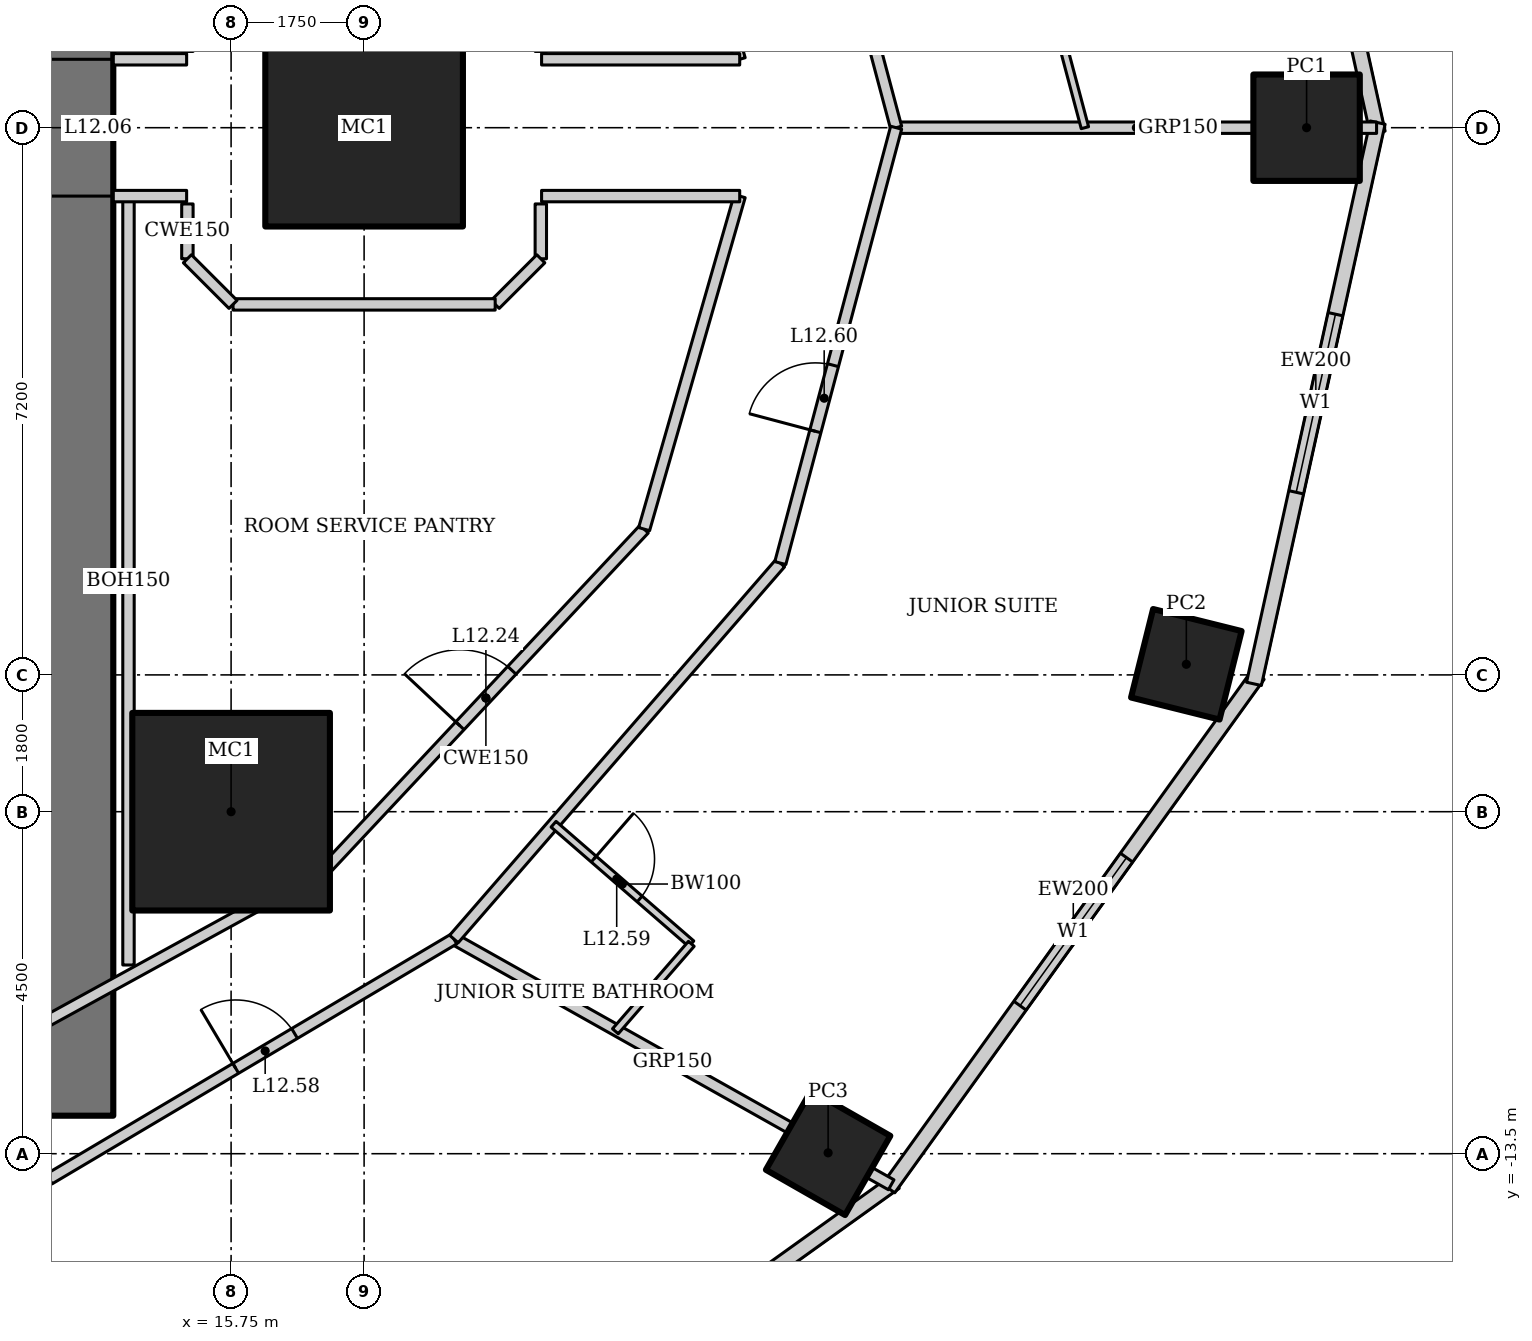
"""IFC4 building model, lengths in metres.
Left out: names, types, materials, properties, quantities, classifications, styles, units other than length and angle.
Written with IfcOpenShell. Run it as: python <this file> out.ifc"""

import sys

from ifc_helpers import new_model, si_unit, direction, frame, frame_2d, origin, origin_2d, place, context, subcontext, project, spatial, rectangle, hollow_rectangle, extrude, element, fill, save


model = new_model("IFC4")
c1 = context("Model", 3, precision=1e-05, world=origin(), true_north=direction((0.0, 1.0)))
c2 = subcontext(c1, "Body", "Model", "MODEL_VIEW")
j1 = project(units=[si_unit("LENGTHUNIT", "METRE"), si_unit("PLANEANGLEUNIT", "RADIAN")], contexts=[c1])
p1 = place(None, origin())
s1 = spatial("IfcSite", under=j1, at=p1, CompositionType="ELEMENT")
p2 = place(p1, origin())
s2 = spatial("IfcBuilding", under=s1, at=p2, CompositionType="ELEMENT")
p3 = place(p2, frame((0.0, 0.0, 58.6)))
s3 = spatial("IfcBuildingStorey", under=s2, at=p3, CompositionType="ELEMENT", Elevation=58.6)
for number, where, z_axis, x_axis in (
    (1, (17.5, 0.0, 0.0), (0.0, 0.0, 1.0), (1.0, 0.0, 0.0)),
    (2, (15.75, -9.0, 0.0), (0.0, 0.0, 1.0), (1.0, 0.0, 0.0)),
):
    element("IfcColumn", number, at=place(p3, frame(where, z_axis=z_axis, x_axis=x_axis)), inside=s3, PredefinedType="COLUMN", context=c2, shape_type="SweptSolid", body=[
        extrude(hollow_rectangle(XDim=2.6, YDim=2.6, WallThickness=0.13, at=origin_2d()), origin(), (0.0, 0.0, 1.0), 3.6),
    ])
p4 = place(p3, frame((29.9, 0.0, 0.0), z_axis=(0.0, 0.0, 1.0), x_axis=(1.0, 0.0, 0.0)))
e3 = element("IfcColumn", 3, at=p4, inside=s3, PredefinedType="COLUMN", context=c2, shape_type="SweptSolid", body=[
    extrude(hollow_rectangle(XDim=1.4, YDim=1.4, WallThickness=0.1, at=origin_2d()), origin(), (0.0, 0.0, 1.0), 3.6),
])
p5 = place(p3, frame((23.605, -13.489, 0.0), z_axis=(0.0, 0.0, 1.0), x_axis=(0.496139221777, 0.86824298017, 0.0)))
e4 = element("IfcColumn", 4, at=p5, inside=s3, PredefinedType="COLUMN", context=c2, shape_type="SweptSolid", body=[
    extrude(hollow_rectangle(XDim=1.2, YDim=1.2, WallThickness=0.12, at=origin_2d()), origin(), (0.0, 0.0, 1.0), 3.6),
])
p6 = place(p3, frame((28.318, -7.06, 0.0), z_axis=(0.0, 0.0, 1.0), x_axis=(0.2419218956, 0.970295726276, 0.0)))
e5 = element("IfcColumn", 5, at=p6, inside=s3, PredefinedType="COLUMN", context=c2, shape_type="SweptSolid", body=[
    extrude(hollow_rectangle(XDim=1.2, YDim=1.2, WallThickness=0.1, at=origin_2d()), origin(), (0.0, 0.0, 1.0), 3.6),
])
p7 = place(p3, frame((13.2, -13.0, 0.0), z_axis=(0.0, 0.0, 1.0), x_axis=(0.0, 1.0, 0.0)))
e6 = element("IfcWall", 6, at=p7, inside=s3, PredefinedType="SHEAR", context=c2, shape_type="SweptSolid", body=[
    extrude(rectangle(XDim=26.0, YDim=2.0, at=frame_2d((13.0, 0.0))), origin(), (0.0, 0.0, 1.0), 3.6),
])
p8 = place(p7, frame((12.1, 0.0, 0.0)))
e7 = element("IfcOpeningElement", 7, at=p8, cuts=e6, PredefinedType="OPENING", context=c2, shape_type="SweptSolid", body=[
    extrude(rectangle(XDim=1.8, YDim=2.1, at=frame_2d((0.9, 1.05))), frame((0.0, 1.01, 0.0), z_axis=(0.0, -1.0, 0.0), x_axis=(1.0, 0.0, 0.0)), (0.0, 0.0, 1.0), 2.02),
])
p9 = place(p3, frame((30.835, -0.067, 0.0), z_axis=(0.0, 0.0, 1.0), x_axis=(-0.215238065514, 0.976561608478, 0.0)))
e8 = element("IfcWall", 8, at=p9, inside=s3, PredefinedType="SOLIDWALL", context=c2, shape_type="SweptSolid", body=[
    extrude(rectangle(XDim=7.562, YDim=0.2, at=frame_2d((3.781, 0.0))), origin(), (0.0, 0.0, 1.0), 3.45),
])
p10 = place(p9, frame((2.581, 0.0, 0.5)))
e9 = element("IfcOpeningElement", 9, at=p10, cuts=e8, PredefinedType="OPENING", context=c2, shape_type="SweptSolid", body=[
    extrude(rectangle(XDim=2.4, YDim=2.2, at=frame_2d((1.2, 1.1))), frame((0.0, 0.11, 0.0), z_axis=(0.0, -1.0, 0.0), x_axis=(1.0, 0.0, 0.0)), (0.0, 0.0, 1.0), 0.22),
])
p11 = place(p3, frame((17.929, -18.572, 0.0), z_axis=(0.0, 0.0, 1.0), x_axis=(0.812791321576, 0.582554948112, 0.0)))
e10 = element("IfcWall", 10, at=p11, inside=s3, PredefinedType="SOLIDWALL", context=c2, shape_type="SweptSolid", body=[
    extrude(rectangle(XDim=8.063, YDim=0.2, at=frame_2d((4.032, 0.0))), origin(), (0.0, 0.0, 1.0), 3.45),
])
p12 = place(p11, frame((2.832, 0.0, 0.5)))
e11 = element("IfcOpeningElement", 11, at=p12, cuts=e10, PredefinedType="OPENING", context=c2, shape_type="SweptSolid", body=[
    extrude(rectangle(XDim=2.4, YDim=2.2, at=frame_2d((1.2, 1.1))), frame((0.0, 0.11, 0.0), z_axis=(0.0, -1.0, 0.0), x_axis=(1.0, 0.0, 0.0)), (0.0, 0.0, 1.0), 0.22),
])
p13 = place(p3, frame((24.4, -13.957, 0.0), z_axis=(0.0, 0.0, 1.0), x_axis=(0.583937613703, 0.811798536155, 0.0)))
e12 = element("IfcWall", 12, at=p13, inside=s3, PredefinedType="SOLIDWALL", context=c2, shape_type="SweptSolid", body=[
    extrude(rectangle(XDim=8.323, YDim=0.2, at=frame_2d((4.162, 0.0))), origin(), (0.0, 0.0, 1.0), 3.45),
])
p14 = place(p13, frame((2.961, 0.0, 0.5)))
e13 = element("IfcOpeningElement", 13, at=p14, cuts=e12, PredefinedType="OPENING", context=c2, shape_type="SweptSolid", body=[
    extrude(rectangle(XDim=2.4, YDim=2.2, at=frame_2d((1.2, 1.1))), frame((0.0, 0.11, 0.0), z_axis=(0.0, -1.0, 0.0), x_axis=(1.0, 0.0, 0.0)), (0.0, 0.0, 1.0), 0.22),
])
p15 = place(p3, frame((29.208, -7.318, 0.0), z_axis=(0.0, 0.0, 1.0), x_axis=(0.215238065514, 0.976561608478, 0.0)))
e14 = element("IfcWall", 14, at=p15, inside=s3, PredefinedType="SOLIDWALL", context=c2, shape_type="SweptSolid", body=[
    extrude(rectangle(XDim=7.562, YDim=0.2, at=frame_2d((3.781, 0.0))), origin(), (0.0, 0.0, 1.0), 3.45),
])
p16 = place(p15, frame((2.581, 0.0, 0.5)))
e15 = element("IfcOpeningElement", 15, at=p16, cuts=e14, PredefinedType="OPENING", context=c2, shape_type="SweptSolid", body=[
    extrude(rectangle(XDim=2.4, YDim=2.2, at=frame_2d((1.2, 1.1))), frame((0.0, 0.11, 0.0), z_axis=(0.0, -1.0, 0.0), x_axis=(1.0, 0.0, 0.0)), (0.0, 0.0, 1.0), 0.22),
])
p17 = place(p3, frame((30.821, 0.0, 0.0), z_axis=(0.0, 0.0, 1.0), x_axis=(-1.0, 0.0, 0.0)))
e16 = element("IfcWall", 16, at=p17, inside=s3, PredefinedType="PARTITIONING", context=c2, shape_type="SweptSolid", body=[
    extrude(rectangle(XDim=6.321, YDim=0.15, at=frame_2d((3.16, 0.0))), origin(), (0.0, 0.0, 1.0), 2.528),
])
p18 = place(p3, frame((24.435, -13.909, 0.0), z_axis=(0.0, 0.0, 1.0), x_axis=(-0.871747379892, 0.489955616001, 0.0)))
e17 = element("IfcWall", 17, at=p18, inside=s3, PredefinedType="PARTITIONING", context=c2, shape_type="SweptSolid", body=[
    extrude(rectangle(XDim=6.6, YDim=0.15, at=frame_2d((3.3, 0.0))), origin(), (0.0, 0.0, 1.0), 2.693),
])
p19 = place(p3, frame((24.5, 0.0, 0.0), z_axis=(0.0, 0.0, 1.0), x_axis=(-0.257083265334, 0.966389256296, 0.0)))
e18 = element("IfcWall", 18, at=p19, inside=s3, PredefinedType="PARTITIONING", context=c2, shape_type="SweptSolid", body=[
    extrude(rectangle(XDim=5.928, YDim=0.15, at=frame_2d((2.964, 0.0))), origin(), (0.0, 0.0, 1.0), 3.45),
])
p20 = place(p3, frame((13.357, -13.832, 0.0), z_axis=(0.0, 0.0, 1.0), x_axis=(0.860147339762, 0.510045639036, 0.0)))
e19 = element("IfcWall", 19, at=p20, inside=s3, PredefinedType="PARTITIONING", context=c2, shape_type="SweptSolid", body=[
    extrude(rectangle(XDim=6.19, YDim=0.15, at=frame_2d((3.095, 0.0))), origin(), (0.0, 0.0, 1.0), 3.45),
])
p21 = place(p20, frame((2.853, 0.0, 0.0)))
e20 = element("IfcOpeningElement", 20, at=p21, cuts=e19, PredefinedType="OPENING", context=c2, shape_type="SweptSolid", body=[
    extrude(rectangle(XDim=0.9, YDim=2.1, at=frame_2d((0.45, 1.05))), frame((0.0, 0.085, 0.0), z_axis=(0.0, -1.0, 0.0), x_axis=(1.0, 0.0, 0.0)), (0.0, 0.0, 1.0), 0.17),
])
p22 = place(p3, frame((18.681, -10.675, 0.0), z_axis=(0.0, 0.0, 1.0), x_axis=(0.655599989166, 0.755108372491, 0.0)))
e21 = element("IfcWall", 21, at=p22, inside=s3, PredefinedType="PARTITIONING", context=c2, shape_type="SweptSolid", body=[
    extrude(rectangle(XDim=6.551, YDim=0.15, at=frame_2d((3.275, 0.0))), origin(), (0.0, 0.0, 1.0), 3.45),
])
p23 = place(p3, frame((22.976, -5.729, 0.0), z_axis=(0.0, 0.0, 1.0), x_axis=(0.257083265334, 0.966389256296, 0.0)))
e22 = element("IfcWall", 22, at=p23, inside=s3, PredefinedType="PARTITIONING", context=c2, shape_type="SweptSolid", body=[
    extrude(rectangle(XDim=5.928, YDim=0.15, at=frame_2d((2.964, 0.0))), origin(), (0.0, 0.0, 1.0), 3.45),
])
p24 = place(p23, frame((1.794, 0.0, 0.0)))
e23 = element("IfcOpeningElement", 23, at=p24, cuts=e22, PredefinedType="OPENING", context=c2, shape_type="SweptSolid", body=[
    extrude(rectangle(XDim=0.9, YDim=2.1, at=frame_2d((0.45, 1.05))), frame((0.0, 0.085, 0.0), z_axis=(0.0, -1.0, 0.0), x_axis=(1.0, 0.0, 0.0)), (0.0, 0.0, 1.0), 0.17),
])
p25 = place(p3, frame((22.442, 0.9, 0.0), z_axis=(0.0, 0.0, 1.0), x_axis=(-0.27585972825, 0.961197903831, 0.0)))
e24 = element("IfcWall", 24, at=p25, inside=s3, PredefinedType="PARTITIONING", context=c2, shape_type="SweptSolid", body=[
    extrude(rectangle(XDim=4.559, YDim=0.15, at=frame_2d((2.279, 0.0))), origin(), (0.0, 0.0, 1.0), 3.45),
])
p26 = place(p3, frame((12.036, -12.464, 0.0), z_axis=(0.0, 0.0, 1.0), x_axis=(0.876522084062, 0.481361647986, 0.0)))
e25 = element("IfcWall", 25, at=p26, inside=s3, PredefinedType="PARTITIONING", context=c2, shape_type="SweptSolid", body=[
    extrude(rectangle(XDim=5.687, YDim=0.15, at=frame_2d((2.844, 0.0))), origin(), (0.0, 0.0, 1.0), 3.45),
])
p27 = place(p3, frame((17.021, -9.726, 0.0), z_axis=(0.0, 0.0, 1.0), x_axis=(0.68365836236, 0.729802194828, 0.0)))
e26 = element("IfcWall", 26, at=p27, inside=s3, PredefinedType="PARTITIONING", context=c2, shape_type="SweptSolid", body=[
    extrude(rectangle(XDim=6.09, YDim=0.15, at=frame_2d((3.045, 0.0))), origin(), (0.0, 0.0, 1.0), 3.45),
])
p28 = place(p27, frame((2.545, 0.0, 0.0)))
e27 = element("IfcOpeningElement", 27, at=p28, cuts=e26, PredefinedType="OPENING", context=c2, shape_type="SweptSolid", body=[
    extrude(rectangle(XDim=1.0, YDim=2.1, at=frame_2d((0.5, 1.05))), frame((0.0, 0.085, 0.0), z_axis=(0.0, -1.0, 0.0), x_axis=(1.0, 0.0, 0.0)), (0.0, 0.0, 1.0), 0.17),
])
p29 = place(p3, frame((21.184, -5.282, 0.0), z_axis=(0.0, 0.0, 1.0), x_axis=(0.27585972825, 0.961197903831, 0.0)))
e28 = element("IfcWall", 28, at=p29, inside=s3, PredefinedType="PARTITIONING", context=c2, shape_type="SweptSolid", body=[
    extrude(rectangle(XDim=4.559, YDim=0.15, at=frame_2d((2.279, 0.0))), origin(), (0.0, 0.0, 1.0), 3.45),
])
p30 = place(p3, frame((14.4, -11.017, 0.0), z_axis=(0.0, 0.0, 1.0), x_axis=(0.0, 1.0, 0.0)))
e29 = element("IfcWall", 29, at=p30, inside=s3, PredefinedType="PARTITIONING", context=c2, shape_type="SweptSolid", body=[
    extrude(rectangle(XDim=10.117, YDim=0.15, at=frame_2d((5.059, 0.0))), origin(), (0.0, 0.0, 1.0), 3.45),
])
p31 = place(p3, frame((26.305, 2.55, 0.0), z_axis=(0.0, 0.0, 1.0), x_axis=(0.257052122515, -0.966397540513, 0.0)))
e30 = element("IfcWall", 30, at=p31, inside=s3, PredefinedType="PARTITIONING", context=c2, shape_type="SweptSolid", body=[
    extrude(rectangle(XDim=2.638, YDim=0.1, at=frame_2d((1.319, 0.0))), origin(), (0.0, 0.0, 1.0), 3.45),
])
p32 = place(p3, frame((19.993, -9.165, 0.0), z_axis=(0.0, 0.0, 1.0), x_axis=(0.755098052661, -0.655611875172, 0.0)))
e31 = element("IfcWall", 31, at=p32, inside=s3, PredefinedType="PARTITIONING", context=c2, shape_type="SweptSolid", body=[
    extrude(rectangle(XDim=2.4, YDim=0.1, at=frame_2d((1.2, 0.0))), origin(), (0.0, 0.0, 1.0), 3.45),
])
p33 = place(p32, frame((0.7, 0.0, 0.0)))
e32 = element("IfcOpeningElement", 32, at=p33, cuts=e31, PredefinedType="OPENING", context=c2, shape_type="SweptSolid", body=[
    extrude(rectangle(XDim=0.8, YDim=2.1, at=frame_2d((0.4, 1.05))), frame((0.0, 0.06, 0.0), z_axis=(0.0, -1.0, 0.0), x_axis=(1.0, 0.0, 0.0)), (0.0, 0.0, 1.0), 0.12),
])
p34 = place(p3, frame((21.805, -10.738, 0.0), z_axis=(0.0, 0.0, 1.0), x_axis=(-0.655528024617, -0.755170847518, 0.0)))
e33 = element("IfcWall", 33, at=p34, inside=s3, PredefinedType="PARTITIONING", context=c2, shape_type="SweptSolid", body=[
    extrude(rectangle(XDim=1.524, YDim=0.1, at=frame_2d((0.762, 0.0))), origin(), (0.0, 0.0, 1.0), 3.45),
])
p35 = place(p3, frame((14.2, -0.9, 0.0), z_axis=(0.0, 0.0, 1.0), x_axis=(1.0, 0.0, 0.0)))
e34 = element("IfcWall", 34, at=p35, inside=s3, PredefinedType="PARTITIONING", context=c2, shape_type="SweptSolid", body=[
    extrude(rectangle(XDim=0.965, YDim=0.15, at=frame_2d((0.482, 0.0))), origin(), (0.0, 0.0, 1.0), 3.45),
])
p36 = place(p3, frame((19.835, -0.9, 0.0), z_axis=(0.0, 0.0, 1.0), x_axis=(1.0, 0.0, 0.0)))
e35 = element("IfcWall", 35, at=p36, inside=s3, PredefinedType="PARTITIONING", context=c2, shape_type="SweptSolid", body=[
    extrude(rectangle(XDim=2.607, YDim=0.15, at=frame_2d((1.303, 0.0))), origin(), (0.0, 0.0, 1.0), 3.45),
])
p37 = place(p3, frame((14.2, 0.9, 0.0), z_axis=(0.0, 0.0, 1.0), x_axis=(1.0, 0.0, 0.0)))
e36 = element("IfcWall", 36, at=p37, inside=s3, PredefinedType="PARTITIONING", context=c2, shape_type="SweptSolid", body=[
    extrude(rectangle(XDim=0.965, YDim=0.15, at=frame_2d((0.482, 0.0))), origin(), (0.0, 0.0, 1.0), 3.45),
])
p38 = place(p3, frame((19.835, 0.9, 0.0), z_axis=(0.0, 0.0, 1.0), x_axis=(1.0, 0.0, 0.0)))
e37 = element("IfcWall", 37, at=p38, inside=s3, PredefinedType="PARTITIONING", context=c2, shape_type="SweptSolid", body=[
    extrude(rectangle(XDim=2.607, YDim=0.15, at=frame_2d((1.303, 0.0))), origin(), (0.0, 0.0, 1.0), 3.45),
])
for number, where, z_axis, x_axis in (
    (38, (15.175, -1.725, 0.0), (0.0, 0.0, 1.0), (0.0, 1.0, 0.0)),
    (39, (19.825, -1.003, 0.0), (0.0, 0.0, 1.0), (0.0, -1.0, 0.0)),
):
    element("IfcWall", number, at=place(p3, frame(where, z_axis=z_axis, x_axis=x_axis)), inside=s3, PredefinedType="PARTITIONING", context=c2, shape_type="SweptSolid", body=[
        extrude(rectangle(XDim=0.721, YDim=0.15, at=frame_2d((0.361, 0.0))), origin(), (0.0, 0.0, 1.0), 3.45),
    ])
p39 = place(p3, frame((19.825, -1.725, 0.0), z_axis=(0.0, 0.0, 1.0), x_axis=(-0.707106781187, -0.707106781187, 0.0)))
e40 = element("IfcWall", 40, at=p39, inside=s3, PredefinedType="PARTITIONING", context=c2, shape_type="SweptSolid", body=[
    extrude(rectangle(XDim=0.849, YDim=0.15, at=frame_2d((0.425, 0.0))), origin(), (0.0, 0.0, 1.0), 3.45),
])
p40 = place(p3, frame((19.225, -2.325, 0.0), z_axis=(0.0, 0.0, 1.0), x_axis=(-1.0, 0.0, 0.0)))
e41 = element("IfcWall", 41, at=p40, inside=s3, PredefinedType="PARTITIONING", context=c2, shape_type="SweptSolid", body=[
    extrude(rectangle(XDim=3.449, YDim=0.15, at=frame_2d((1.725, 0.0))), origin(), (0.0, 0.0, 1.0), 3.45),
])
p41 = place(p3, frame((15.775, -2.325, 0.0), z_axis=(0.0, 0.0, 1.0), x_axis=(-0.707106781187, 0.707106781187, 0.0)))
e42 = element("IfcWall", 42, at=p41, inside=s3, PredefinedType="PARTITIONING", context=c2, shape_type="SweptSolid", body=[
    extrude(rectangle(XDim=0.849, YDim=0.15, at=frame_2d((0.425, 0.0))), origin(), (0.0, 0.0, 1.0), 3.45),
])
p42 = place(p14, origin())
e43 = element("IfcWindow", 43, at=p42, inside=s3, PartitioningType="SINGLE_PANEL", PredefinedType="WINDOW", context=c2, shape_type="SweptSolid", body=[
    extrude(rectangle(XDim=2.4, YDim=2.2, at=frame_2d((1.2, 1.1))), frame((0.0, 0.03, 0.0), z_axis=(0.0, -1.0, 0.0), x_axis=(1.0, 0.0, 0.0)), (0.0, 0.0, 1.0), 0.06),
])
fill(e13, e43)
p43 = place(p16, origin())
e44 = element("IfcWindow", 44, at=p43, inside=s3, PartitioningType="SINGLE_PANEL", PredefinedType="WINDOW", context=c2, shape_type="SweptSolid", body=[
    extrude(rectangle(XDim=2.4, YDim=2.2, at=frame_2d((1.2, 1.1))), frame((0.0, 0.03, 0.0), z_axis=(0.0, -1.0, 0.0), x_axis=(1.0, 0.0, 0.0)), (0.0, 0.0, 1.0), 0.06),
])
fill(e15, e44)
p44 = place(p28, origin())
e45 = element("IfcDoor", 45, at=p44, inside=s3, OperationType="SINGLE_SWING_LEFT", PredefinedType="DOOR", context=c2, shape_type="SweptSolid", body=[
    extrude(rectangle(XDim=1.0, YDim=2.1, at=frame_2d((0.5, 1.05))), frame((0.0, 0.025, 0.0), z_axis=(0.0, -1.0, 0.0), x_axis=(1.0, 0.0, 0.0)), (0.0, 0.0, 1.0), 0.05),
])
fill(e27, e45)
p45 = place(p21, origin())
e46 = element("IfcDoor", 46, at=p45, inside=s3, OperationType="SINGLE_SWING_LEFT", PredefinedType="DOOR", context=c2, shape_type="SweptSolid", body=[
    extrude(rectangle(XDim=0.9, YDim=2.1, at=frame_2d((0.45, 1.05))), frame((0.0, 0.025, 0.0), z_axis=(0.0, -1.0, 0.0), x_axis=(1.0, 0.0, 0.0)), (0.0, 0.0, 1.0), 0.05),
])
fill(e20, e46)
p46 = place(p33, origin())
e47 = element("IfcDoor", 47, at=p46, inside=s3, OperationType="SINGLE_SWING_LEFT", PredefinedType="DOOR", context=c2, shape_type="SweptSolid", body=[
    extrude(rectangle(XDim=0.8, YDim=2.1, at=frame_2d((0.4, 1.05))), frame((0.0, 0.025, 0.0), z_axis=(0.0, -1.0, 0.0), x_axis=(1.0, 0.0, 0.0)), (0.0, 0.0, 1.0), 0.05),
])
fill(e32, e47)
p47 = place(p24, origin())
e48 = element("IfcDoor", 48, at=p47, inside=s3, OperationType="SINGLE_SWING_LEFT", PredefinedType="DOOR", context=c2, shape_type="SweptSolid", body=[
    extrude(rectangle(XDim=0.9, YDim=2.1, at=frame_2d((0.45, 1.05))), frame((0.0, 0.025, 0.0), z_axis=(0.0, -1.0, 0.0), x_axis=(1.0, 0.0, 0.0)), (0.0, 0.0, 1.0), 0.05),
])
fill(e23, e48)
save(model, sys.argv[1])
